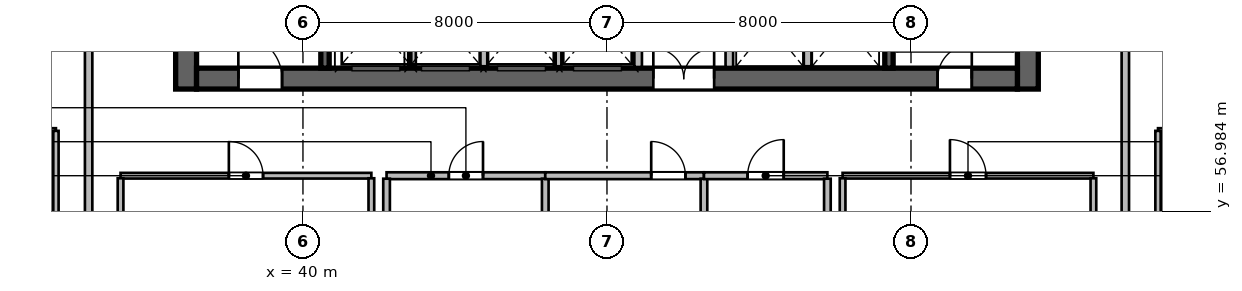
"""IFC4 building model, lengths in metres.
Left out: names, types, materials, properties, quantities, classifications, styles, units other than length and angle.
Written with IfcOpenShell. Run it as: python <this file> out.ifc"""

import sys

from ifc_helpers import new_model, si_unit, direction, frame, frame_2d, origin, place, context, subcontext, project, spatial, rectangle, extrude, source, transform, mapped, element, fill, save


model = new_model("IFC4")
c1 = context("Model", 3, precision=1e-05, world=origin(), true_north=direction((0.0, 1.0)))
c2 = subcontext(c1, "Body", "Model", "MODEL_VIEW")
j1 = project(units=[si_unit("LENGTHUNIT", "METRE"), si_unit("PLANEANGLEUNIT", "RADIAN")], contexts=[c1])
p1 = place(None, origin())
s1 = spatial("IfcSite", under=j1, at=p1, CompositionType="ELEMENT")
p2 = place(p1, origin())
s2 = spatial("IfcBuilding", under=s1, at=p2, CompositionType="ELEMENT")
p3 = place(p2, frame((0.0, 0.0, 82.2)))
s3 = spatial("IfcBuildingStorey", under=s2, at=p3, CompositionType="ELEMENT", Elevation=82.2)
m1 = source(origin(), c2, "Body", "SweptSolid", [
    extrude(rectangle(XDim=12.0, YDim=0.55, at=frame_2d((6.0, 0.0))), origin(), (0.0, 0.0, 1.0), 3.6),
])
for number, where, z_axis, x_axis in (
    (1, (36.925, 60.2, 0.0), (0.0, 0.0, 1.0), (0.0, 1.0, 0.0)),
    (2, (59.075, 60.2, 0.0), (0.0, 0.0, 1.0), (0.0, 1.0, 0.0)),
):
    element("IfcWall", number, at=place(p3, frame(where, z_axis=z_axis, x_axis=x_axis)), inside=s3, PredefinedType="SHEAR", context=c2, shape_type="MappedRepresentation", body=[
        mapped(m1, transform((0.0, 0.0, 0.0), scale=1.0)),
    ])
m2 = source(origin(), c2, "Body", "SweptSolid", [
    extrude(rectangle(XDim=21.6, YDim=0.55, at=frame_2d((10.8, 0.0))), origin(), (0.0, 0.0, 1.0), 3.6),
])
p4 = place(p3, frame((37.2, 60.475, 0.0), z_axis=(0.0, 0.0, 1.0), x_axis=(1.0, 0.0, 0.0)))
e3 = element("IfcWall", 3, at=p4, inside=s3, PredefinedType="SHEAR", context=c2, shape_type="MappedRepresentation", body=[
    mapped(m2, transform((0.0, 0.0, 0.0), scale=1.0)),
])
p5 = place(p4, frame((1.1, 0.0, 0.0)))
e4 = element("IfcOpeningElement", 4, at=p5, cuts=e3, PredefinedType="OPENING", context=c2, shape_type="SweptSolid", body=[
    extrude(rectangle(XDim=1.15, YDim=2.15, at=frame_2d((0.575, 1.075))), frame((0.0, 0.285, 0.0), z_axis=(0.0, -1.0, 0.0), x_axis=(1.0, 0.0, 0.0)), (0.0, 0.0, 1.0), 0.57),
])
p6 = place(p4, frame((19.5, 0.0, 0.0)))
e5 = element("IfcOpeningElement", 5, at=p6, cuts=e3, PredefinedType="OPENING", context=c2, shape_type="SweptSolid", body=[
    extrude(rectangle(XDim=0.9, YDim=2.1, at=frame_2d((0.45, 1.05))), frame((0.0, 0.285, 0.0), z_axis=(0.0, -1.0, 0.0), x_axis=(1.0, 0.0, 0.0)), (0.0, 0.0, 1.0), 0.57),
])
p7 = place(p4, frame((12.02, 0.0, 0.0)))
e6 = element("IfcOpeningElement", 6, at=p7, cuts=e3, PredefinedType="OPENING", context=c2, shape_type="SweptSolid", body=[
    extrude(rectangle(XDim=1.6, YDim=2.15, at=frame_2d((0.8, 1.075))), frame((0.0, 0.285, 0.0), z_axis=(0.0, -1.0, 0.0), x_axis=(1.0, 0.0, 0.0)), (0.0, 0.0, 1.0), 0.57),
])
m3 = source(origin(), c2, "Body", "SweptSolid", [
    extrude(rectangle(XDim=10.9, YDim=0.22, at=frame_2d((5.45, 0.0))), origin(), (0.0, 0.0, 1.0), 3.6),
])
p8 = place(p3, frame((40.58, 60.75, 0.0), z_axis=(0.0, 0.0, 1.0), x_axis=(0.0, 1.0, 0.0)))
e7 = element("IfcWall", 7, at=p8, inside=s3, PredefinedType="SHEAR", context=c2, shape_type="MappedRepresentation", body=[
    mapped(m3, transform((0.0, 0.0, 0.0), scale=1.0)),
])
p9 = place(p3, frame((55.42, 60.75, 0.0), z_axis=(0.0, 0.0, 1.0), x_axis=(0.0, 1.0, 0.0)))
e8 = element("IfcWall", 8, at=p9, inside=s3, PredefinedType="SHEAR", context=c2, shape_type="MappedRepresentation", body=[
    mapped(m3, transform((0.0, 0.0, 0.0), scale=1.0)),
])
p10 = place(p9, frame((9.495, 0.0, 0.0)))
e9 = element("IfcOpeningElement", 9, at=p10, cuts=e8, PredefinedType="OPENING", context=c2, shape_type="SweptSolid", body=[
    extrude(rectangle(XDim=1.15, YDim=2.15, at=frame_2d((0.575, 1.075))), frame((0.0, 0.12, 0.0), z_axis=(0.0, -1.0, 0.0), x_axis=(1.0, 0.0, 0.0)), (0.0, 0.0, 1.0), 0.24),
])
m4 = source(origin(), c2, "Body", "SweptSolid", [
    extrude(rectangle(XDim=2.24, YDim=0.2, at=frame_2d((1.12, 0.0))), origin(), (0.0, 0.0, 1.0), 3.28),
])
for number, where, z_axis, x_axis in (
    (10, (48.82, 60.78, 0.0), (0.0, 0.0, 1.0), (0.0, 1.0, 0.0)),
    (11, (51.22, 60.78, 0.0), (0.0, 0.0, 1.0), (0.0, 1.0, 0.0)),
):
    element("IfcWall", number, at=place(p3, frame(where, z_axis=z_axis, x_axis=x_axis)), inside=s3, PredefinedType="SOLIDWALL", context=c2, shape_type="MappedRepresentation", body=[
        mapped(m4, transform((0.0, 0.0, 0.0), scale=1.0)),
    ])
m5 = source(origin(), c2, "Body", "SweptSolid", [
    extrude(rectangle(XDim=2.2, YDim=0.2, at=frame_2d((1.1, 0.0))), origin(), (0.0, 0.0, 1.0), 3.28),
])
for number, where, z_axis, x_axis in (
    (12, (42.87, 60.8, 0.0), (0.0, 0.0, 1.0), (0.0, 1.0, 0.0)),
    (13, (44.77, 60.8, 0.0), (0.0, 0.0, 1.0), (0.0, 1.0, 0.0)),
    (14, (46.7, 60.8, 0.0), (0.0, 0.0, 1.0), (0.0, 1.0, 0.0)),
    (15, (53.28, 60.8, 0.0), (0.0, 0.0, 1.0), (0.0, 1.0, 0.0)),
):
    element("IfcWall", number, at=place(p3, frame(where, z_axis=z_axis, x_axis=x_axis)), inside=s3, PredefinedType="SOLIDWALL", context=c2, shape_type="MappedRepresentation", body=[
        mapped(m5, transform((0.0, 0.0, 0.0), scale=1.0)),
    ])
m6 = source(origin(), c2, "Body", "SweptSolid", [
    extrude(rectangle(XDim=6.6, YDim=0.15, at=frame_2d((3.3, 0.0))), origin(), (0.0, 0.0, 1.0), 3.28),
])
p11 = place(p3, frame((35.2, 57.92, 0.0), z_axis=(0.0, 0.0, 1.0), x_axis=(1.0, 0.0, 0.0)))
e16 = element("IfcWall", 16, at=p11, inside=s3, PredefinedType="PARTITIONING", context=c2, shape_type="MappedRepresentation", body=[
    mapped(m6, transform((0.0, 0.0, 0.0), scale=1.0)),
])
p12 = place(p11, frame((2.85, 0.0, 0.0)))
e17 = element("IfcOpeningElement", 17, at=p12, cuts=e16, PredefinedType="OPENING", context=c2, shape_type="SweptSolid", body=[
    extrude(rectangle(XDim=0.9, YDim=2.1, at=frame_2d((0.45, 1.05))), frame((0.0, 0.085, 0.0), z_axis=(0.0, -1.0, 0.0), x_axis=(1.0, 0.0, 0.0)), (0.0, 0.0, 1.0), 0.17),
])
m7 = source(origin(), c2, "Body", "SweptSolid", [
    extrude(rectangle(XDim=3.785, YDim=0.15, at=frame_2d((1.893, 0.0))), origin(), (0.0, 0.0, 1.0), 3.28),
])
for number, where, z_axis, x_axis in (
    (18, (35.2, 54.067, 0.0), (0.0, 0.0, 1.0), (0.0, 1.0, 0.0)),
    (19, (41.8, 54.067, 0.0), (0.0, 0.0, 1.0), (0.0, 1.0, 0.0)),
):
    element("IfcWall", number, at=place(p3, frame(where, z_axis=z_axis, x_axis=x_axis)), inside=s3, PredefinedType="PARTITIONING", context=c2, shape_type="MappedRepresentation", body=[
        mapped(m7, transform((0.0, 0.0, 0.0), scale=1.0)),
    ])
m8 = source(origin(), c2, "Body", "SweptSolid", [
    extrude(rectangle(XDim=4.176, YDim=0.18, at=frame_2d((2.088, 0.0))), origin(), (0.0, 0.0, 1.0), 3.28),
])
p13 = place(p3, frame((42.2, 57.92, 0.0), z_axis=(0.0, 0.0, 1.0), x_axis=(1.0, 0.0, 0.0)))
e20 = element("IfcWall", 20, at=p13, inside=s3, PredefinedType="PLUMBINGWALL", context=c2, shape_type="MappedRepresentation", body=[
    mapped(m8, transform((0.0, 0.0, 0.0), scale=1.0)),
])
p14 = place(p13, frame((1.638, 0.0, 0.0)))
e21 = element("IfcOpeningElement", 21, at=p14, cuts=e20, PredefinedType="OPENING", context=c2, shape_type="SweptSolid", body=[
    extrude(rectangle(XDim=0.9, YDim=2.08, at=frame_2d((0.45, 1.04))), frame((0.0, 0.1, 0.0), z_axis=(0.0, -1.0, 0.0), x_axis=(1.0, 0.0, 0.0)), (0.0, 0.0, 1.0), 0.2),
])
m9 = source(origin(), c2, "Body", "SweptSolid", [
    extrude(rectangle(XDim=3.763, YDim=0.175, at=frame_2d((1.881, 0.0))), origin(), (0.0, 0.0, 1.0), 3.28),
])
for number, where, z_axis, x_axis in (
    (22, (42.2, 54.079, 0.0), (0.0, 0.0, 1.0), (0.0, 1.0, 0.0)),
    (23, (46.376, 54.079, 0.0), (0.0, 0.0, 1.0), (0.0, 1.0, 0.0)),
):
    element("IfcWall", number, at=place(p3, frame(where, z_axis=z_axis, x_axis=x_axis)), inside=s3, PredefinedType="PARTITIONING", context=c2, shape_type="MappedRepresentation", body=[
        mapped(m9, transform((0.0, 0.0, 0.0), scale=1.0)),
    ])
p15 = place(p3, frame((46.376, 57.92, 0.0), z_axis=(0.0, 0.0, 1.0), x_axis=(1.0, 0.0, 0.0)))
e24 = element("IfcWall", 24, at=p15, inside=s3, PredefinedType="PLUMBINGWALL", context=c2, shape_type="MappedRepresentation", body=[
    mapped(m8, transform((0.0, 0.0, 0.0), scale=1.0)),
])
p16 = place(p15, frame((2.788, 0.0, 0.0)))
e25 = element("IfcOpeningElement", 25, at=p16, cuts=e24, PredefinedType="OPENING", context=c2, shape_type="SweptSolid", body=[
    extrude(rectangle(XDim=0.9, YDim=2.08, at=frame_2d((0.45, 1.04))), frame((0.0, 0.1, 0.0), z_axis=(0.0, -1.0, 0.0), x_axis=(1.0, 0.0, 0.0)), (0.0, 0.0, 1.0), 0.2),
])
p17 = place(p3, frame((50.552, 54.079, 0.0), z_axis=(0.0, 0.0, 1.0), x_axis=(0.0, 1.0, 0.0)))
e26 = element("IfcWall", 26, at=p17, inside=s3, PredefinedType="PARTITIONING", context=c2, shape_type="MappedRepresentation", body=[
    mapped(m9, transform((0.0, 0.0, 0.0), scale=1.0)),
])
m10 = source(origin(), c2, "Body", "SweptSolid", [
    extrude(rectangle(XDim=3.248, YDim=0.18, at=frame_2d((1.624, 0.0))), origin(), (0.0, 0.0, 1.0), 3.28),
])
p18 = place(p3, frame((50.552, 57.92, 0.0), z_axis=(0.0, 0.0, 1.0), x_axis=(1.0, 0.0, 0.0)))
e27 = element("IfcWall", 27, at=p18, inside=s3, PredefinedType="PLUMBINGWALL", context=c2, shape_type="MappedRepresentation", body=[
    mapped(m10, transform((0.0, 0.0, 0.0), scale=1.0)),
])
p19 = place(p18, frame((1.149, 0.0, 0.0)))
e28 = element("IfcOpeningElement", 28, at=p19, cuts=e27, PredefinedType="OPENING", context=c2, shape_type="SweptSolid", body=[
    extrude(rectangle(XDim=0.95, YDim=2.12, at=frame_2d((0.475, 1.06))), frame((0.0, 0.1, 0.0), z_axis=(0.0, -1.0, 0.0), x_axis=(1.0, 0.0, 0.0)), (0.0, 0.0, 1.0), 0.2),
])
p20 = place(p3, frame((53.8, 54.079, 0.0), z_axis=(0.0, 0.0, 1.0), x_axis=(0.0, 1.0, 0.0)))
e29 = element("IfcWall", 29, at=p20, inside=s3, PredefinedType="PARTITIONING", context=c2, shape_type="MappedRepresentation", body=[
    mapped(m9, transform((0.0, 0.0, 0.0), scale=1.0)),
])
p21 = place(p3, frame((54.2, 57.92, 0.0), z_axis=(0.0, 0.0, 1.0), x_axis=(1.0, 0.0, 0.0)))
e30 = element("IfcWall", 30, at=p21, inside=s3, PredefinedType="PARTITIONING", context=c2, shape_type="MappedRepresentation", body=[
    mapped(m6, transform((0.0, 0.0, 0.0), scale=1.0)),
])
p22 = place(p21, frame((2.825, 0.0, 0.0)))
e31 = element("IfcOpeningElement", 31, at=p22, cuts=e30, PredefinedType="OPENING", context=c2, shape_type="SweptSolid", body=[
    extrude(rectangle(XDim=0.95, YDim=2.1, at=frame_2d((0.475, 1.05))), frame((0.0, 0.085, 0.0), z_axis=(0.0, -1.0, 0.0), x_axis=(1.0, 0.0, 0.0)), (0.0, 0.0, 1.0), 0.17),
])
for number, where, z_axis, x_axis in (
    (32, (54.2, 54.067, 0.0), (0.0, 0.0, 1.0), (0.0, 1.0, 0.0)),
    (33, (60.8, 54.067, 0.0), (0.0, 0.0, 1.0), (0.0, 1.0, 0.0)),
):
    element("IfcWall", number, at=place(p3, frame(where, z_axis=z_axis, x_axis=x_axis)), inside=s3, PredefinedType="PARTITIONING", context=c2, shape_type="MappedRepresentation", body=[
        mapped(m7, transform((0.0, 0.0, 0.0), scale=1.0)),
    ])
m11 = source(origin(), c2, "Body", "SweptSolid", [
    extrude(rectangle(XDim=16.134, YDim=0.195, at=frame_2d((8.067, 0.0))), origin(), (0.0, 0.0, 1.0), 3.28),
])
p23 = place(p3, frame((34.36, 45.326, 0.0), z_axis=(0.0, 0.0, 1.0), x_axis=(0.0, 1.0, 0.0)))
e34 = element("IfcWall", 34, at=p23, inside=s3, PredefinedType="PARTITIONING", context=c2, shape_type="MappedRepresentation", body=[
    mapped(m11, transform((0.0, 0.0, 0.0), scale=1.0)),
])
m12 = source(origin(), c2, "Body", "SweptSolid", [
    extrude(rectangle(XDim=16.134, YDim=0.195, at=frame_2d((8.067, 0.0))), origin(), (0.0, 0.0, 1.0), 2.564),
])
p24 = place(p3, frame((61.64, 45.326, 0.0), z_axis=(0.0, 0.0, 1.0), x_axis=(0.0, 1.0, 0.0)))
e35 = element("IfcWall", 35, at=p24, inside=s3, PredefinedType="PARTITIONING", context=c2, shape_type="MappedRepresentation", body=[
    mapped(m12, transform((0.0, 0.0, 0.0), scale=1.0)),
])
m13 = source(origin(), c2, "Body", "SweptSolid", [
    extrude(rectangle(XDim=2.7, YDim=0.14, at=frame_2d((1.35, 0.0))), origin(), (0.0, 0.0, 1.0), 3.28),
])
p25 = place(p3, frame((30.8, 59.1, 0.0), z_axis=(0.0, 0.0, 1.0), x_axis=(1.0, 0.0, 0.0)))
e36 = element("IfcWall", 36, at=p25, inside=s3, PredefinedType="PARTITIONING", context=c2, shape_type="MappedRepresentation", body=[
    mapped(m13, transform((0.0, 0.0, 0.0), scale=1.0)),
])
m14 = source(origin(), c2, "Body", "SweptSolid", [
    extrude(rectangle(XDim=2.6, YDim=0.14, at=frame_2d((1.3, 0.0))), origin(), (0.0, 0.0, 1.0), 3.28),
])
p26 = place(p3, frame((33.5, 56.5, 0.0), z_axis=(0.0, 0.0, 1.0), x_axis=(0.0, 1.0, 0.0)))
e37 = element("IfcWall", 37, at=p26, inside=s3, PredefinedType="PARTITIONING", context=c2, shape_type="MappedRepresentation", body=[
    mapped(m14, transform((0.0, 0.0, 0.0), scale=1.0)),
])
p27 = place(p3, frame((62.5, 59.1, 0.0), z_axis=(0.0, 0.0, 1.0), x_axis=(1.0, 0.0, 0.0)))
e38 = element("IfcWall", 38, at=p27, inside=s3, PredefinedType="PARTITIONING", context=c2, shape_type="MappedRepresentation", body=[
    mapped(m13, transform((0.0, 0.0, 0.0), scale=1.0)),
])
p28 = place(p3, frame((62.5, 56.5, 0.0), z_axis=(0.0, 0.0, 1.0), x_axis=(0.0, 1.0, 0.0)))
e39 = element("IfcWall", 39, at=p28, inside=s3, PredefinedType="PARTITIONING", context=c2, shape_type="MappedRepresentation", body=[
    mapped(m14, transform((0.0, 0.0, 0.0), scale=1.0)),
])
m15 = source(origin(), c2, "Body", "SweptSolid", [
    extrude(rectangle(XDim=1.15, YDim=2.15, at=frame_2d((0.575, 1.075))), frame((0.0, 0.025, 0.0), z_axis=(0.0, -1.0, 0.0), x_axis=(1.0, 0.0, 0.0)), (0.0, 0.0, 1.0), 0.05),
])
p29 = place(p5, origin())
e40 = element("IfcDoor", 40, at=p29, inside=s3, OperationType="SINGLE_SWING_LEFT", PredefinedType="DOOR", context=c2, shape_type="MappedRepresentation", body=[
    mapped(m15, transform((0.0, 0.0, 0.0), scale=1.0)),
])
fill(e4, e40)
m16 = source(origin(), c2, "Body", "SweptSolid", [
    extrude(rectangle(XDim=0.9, YDim=2.1, at=frame_2d((0.45, 1.05))), frame((0.0, 0.025, 0.0), z_axis=(0.0, -1.0, 0.0), x_axis=(1.0, 0.0, 0.0)), (0.0, 0.0, 1.0), 0.05),
])
p30 = place(p6, origin())
e41 = element("IfcDoor", 41, at=p30, inside=s3, OperationType="SINGLE_SWING_RIGHT", PredefinedType="DOOR", context=c2, shape_type="MappedRepresentation", body=[
    mapped(m16, transform((0.0, 0.0, 0.0), scale=1.0)),
])
fill(e5, e41)
m17 = source(origin(), c2, "Body", "SweptSolid", [
    extrude(rectangle(XDim=1.6, YDim=2.15, at=frame_2d((0.8, 1.075))), frame((0.0, 0.025, 0.0), z_axis=(0.0, -1.0, 0.0), x_axis=(1.0, 0.0, 0.0)), (0.0, 0.0, 1.0), 0.05),
])
p31 = place(p7, origin())
e42 = element("IfcDoor", 42, at=p31, inside=s3, OperationType="DOUBLE_DOOR_SINGLE_SWING", PredefinedType="DOOR", context=c2, shape_type="MappedRepresentation", body=[
    mapped(m17, transform((0.0, 0.0, 0.0), scale=1.0)),
])
fill(e6, e42)
p32 = place(p12, origin())
e43 = element("IfcDoor", 43, at=p32, inside=s3, OperationType="SINGLE_SWING_LEFT", PredefinedType="DOOR", context=c2, shape_type="MappedRepresentation", body=[
    mapped(m16, transform((0.0, 0.0, 0.0), scale=1.0)),
])
fill(e17, e43)
m18 = source(origin(), c2, "Body", "SweptSolid", [
    extrude(rectangle(XDim=0.9, YDim=2.08, at=frame_2d((0.45, 1.04))), frame((0.0, 0.025, 0.0), z_axis=(0.0, -1.0, 0.0), x_axis=(1.0, 0.0, 0.0)), (0.0, 0.0, 1.0), 0.05),
])
p33 = place(p14, origin())
e44 = element("IfcDoor", 44, at=p33, inside=s3, OperationType="SINGLE_SWING_RIGHT", PredefinedType="DOOR", context=c2, shape_type="MappedRepresentation", body=[
    mapped(m18, transform((0.0, 0.0, 0.0), scale=1.0)),
])
fill(e21, e44)
p34 = place(p16, origin())
e45 = element("IfcDoor", 45, at=p34, inside=s3, OperationType="SINGLE_SWING_LEFT", PredefinedType="DOOR", context=c2, shape_type="MappedRepresentation", body=[
    mapped(m18, transform((0.0, 0.0, 0.0), scale=1.0)),
])
fill(e25, e45)
m19 = source(origin(), c2, "Body", "SweptSolid", [
    extrude(rectangle(XDim=0.95, YDim=2.12, at=frame_2d((0.475, 1.06))), frame((0.0, 0.025, 0.0), z_axis=(0.0, -1.0, 0.0), x_axis=(1.0, 0.0, 0.0)), (0.0, 0.0, 1.0), 0.05),
])
p35 = place(p19, origin())
e46 = element("IfcDoor", 46, at=p35, inside=s3, OperationType="SINGLE_SWING_RIGHT", PredefinedType="DOOR", context=c2, shape_type="MappedRepresentation", body=[
    mapped(m19, transform((0.0, 0.0, 0.0), scale=1.0)),
])
fill(e28, e46)
m20 = source(origin(), c2, "Body", "SweptSolid", [
    extrude(rectangle(XDim=0.95, YDim=2.1, at=frame_2d((0.475, 1.05))), frame((0.0, 0.025, 0.0), z_axis=(0.0, -1.0, 0.0), x_axis=(1.0, 0.0, 0.0)), (0.0, 0.0, 1.0), 0.05),
])
p36 = place(p22, origin())
e47 = element("IfcDoor", 47, at=p36, inside=s3, OperationType="SINGLE_SWING_LEFT", PredefinedType="DOOR", context=c2, shape_type="MappedRepresentation", body=[
    mapped(m20, transform((0.0, 0.0, 0.0), scale=1.0)),
])
fill(e31, e47)
save(model, sys.argv[1])
